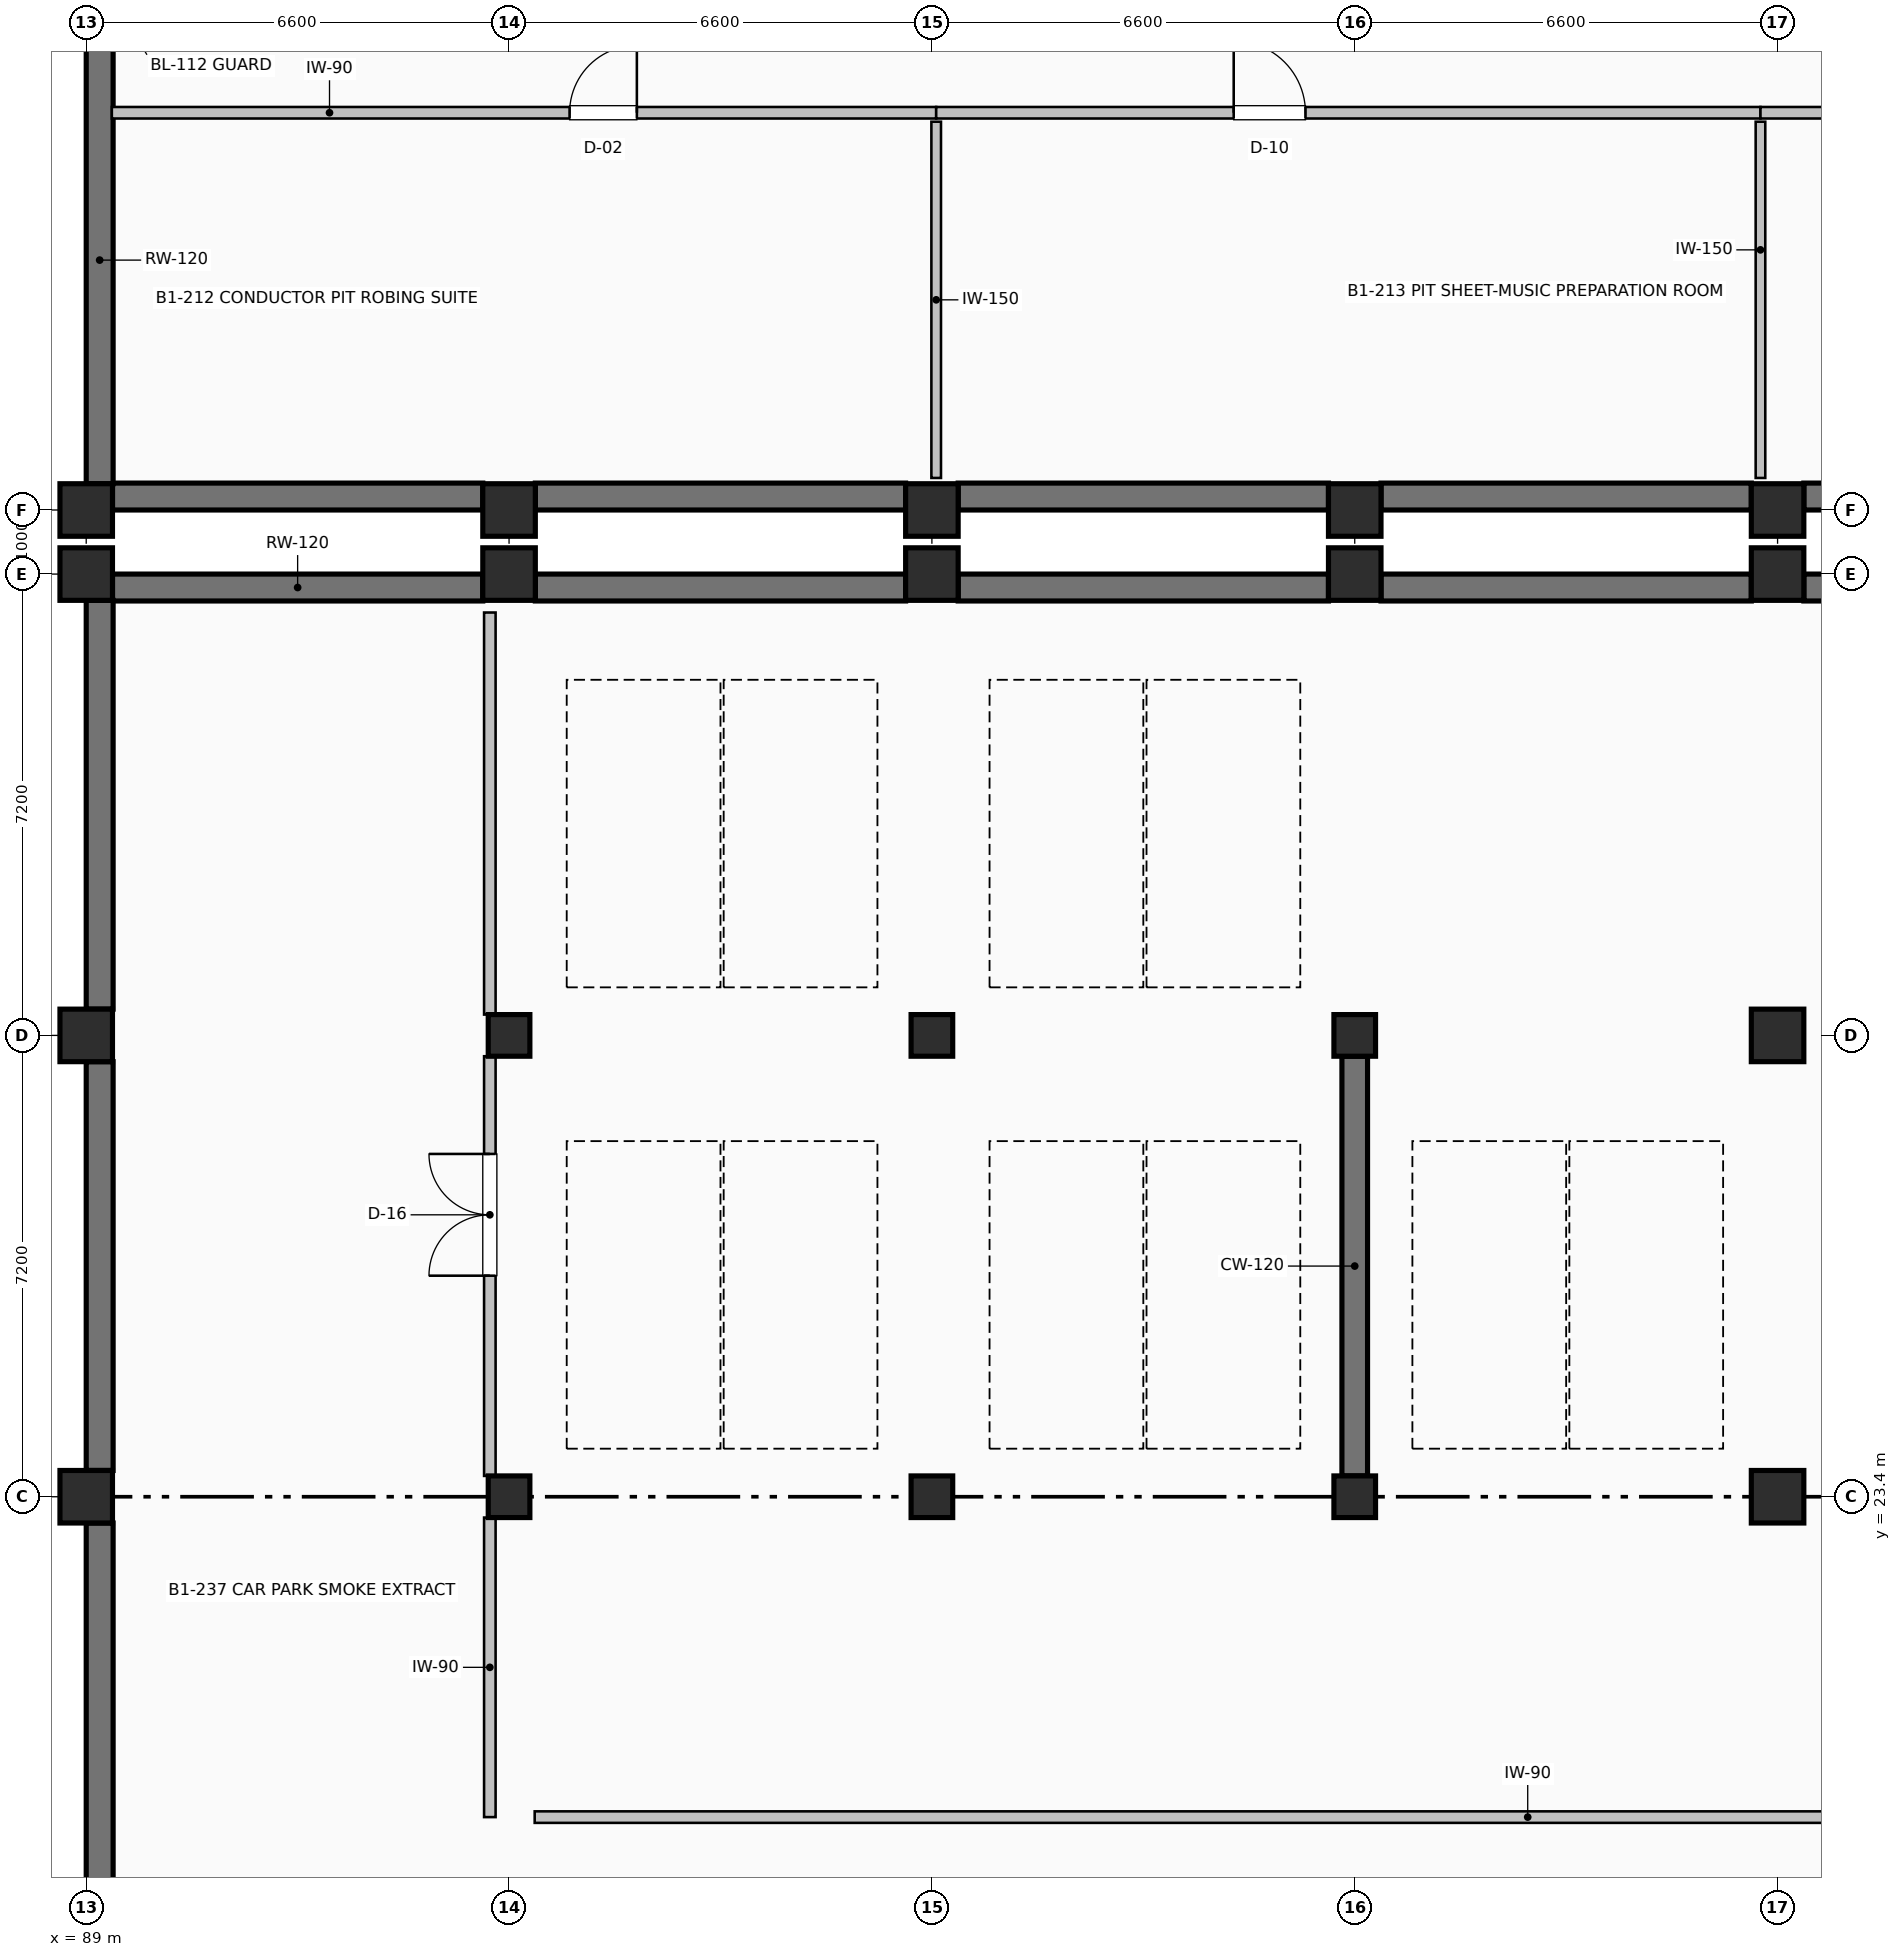
"""IFC4 building model, lengths in metres.
Left out: names, types, materials, properties, quantities, classifications, styles, units other than length and angle.
Written with IfcOpenShell. Run it as: python <this file> out.ifc"""

import sys

from ifc_helpers import new_model, si_unit, direction, frame, frame_2d, origin, origin_2d, place, context, subcontext, project, spatial, rectangle, extrude, element, fill, save


model = new_model("IFC4")
c1 = context("Model", 3, precision=1e-05, world=origin(), true_north=direction((0.0, 1.0)))
c2 = subcontext(c1, "Body", "Model", "MODEL_VIEW")
j1 = project(units=[si_unit("LENGTHUNIT", "METRE"), si_unit("PLANEANGLEUNIT", "RADIAN")], contexts=[c1])
p1 = place(None, origin())
s1 = spatial("IfcSite", under=j1, at=p1, CompositionType="ELEMENT")
p2 = place(p1, origin())
s2 = spatial("IfcBuilding", under=s1, at=p2, CompositionType="ELEMENT")
p3 = place(p2, frame((0.0, 0.0, -4.8)))
s3 = spatial("IfcBuildingStorey", under=s2, at=p3, CompositionType="ELEMENT", Elevation=-4.8)
for number, where, z_axis, x_axis in (
    (1, (89.0, 38.8, 0.0), (0.0, 0.0, 1.0), (1.0, 0.0, 0.0)),
    (2, (95.6, 38.8, 0.0), (0.0, 0.0, 1.0), (1.0, 0.0, 0.0)),
    (3, (102.2, 38.8, 0.0), (0.0, 0.0, 1.0), (1.0, 0.0, 0.0)),
    (4, (108.8, 38.8, 0.0), (0.0, 0.0, 1.0), (1.0, 0.0, 0.0)),
    (5, (115.4, 38.8, 0.0), (0.0, 0.0, 1.0), (1.0, 0.0, 0.0)),
    (6, (89.0, 23.4, 0.0), (0.0, 0.0, 1.0), (1.0, 0.0, 0.0)),
    (7, (89.0, 30.6, 0.0), (0.0, 0.0, 1.0), (1.0, 0.0, 0.0)),
    (8, (89.0, 37.8, 0.0), (0.0, 0.0, 1.0), (1.0, 0.0, 0.0)),
):
    element("IfcColumn", number, at=place(p3, frame(where, z_axis=z_axis, x_axis=x_axis)), inside=s3, PredefinedType="COLUMN", context=c2, shape_type="SweptSolid", body=[
        extrude(rectangle(XDim=0.82, YDim=0.82, at=origin_2d()), origin(), (0.0, 0.0, 1.0), 4.8),
    ])
for number, where, z_axis, x_axis in (
    (9, (95.6, 23.4, 0.0), (0.0, 0.0, 1.0), (1.0, 0.0, 0.0)),
    (10, (95.6, 30.6, 0.0), (0.0, 0.0, 1.0), (1.0, 0.0, 0.0)),
):
    element("IfcColumn", number, at=place(p3, frame(where, z_axis=z_axis, x_axis=x_axis)), inside=s3, PredefinedType="COLUMN", context=c2, shape_type="SweptSolid", body=[
        extrude(rectangle(XDim=0.65, YDim=0.65, at=origin_2d()), origin(), (0.0, 0.0, 1.0), 4.8),
    ])
p4 = place(p3, frame((95.6, 37.8, 0.0), z_axis=(0.0, 0.0, 1.0), x_axis=(1.0, 0.0, 0.0)))
e11 = element("IfcColumn", 11, at=p4, inside=s3, PredefinedType="COLUMN", context=c2, shape_type="SweptSolid", body=[
    extrude(rectangle(XDim=0.82, YDim=0.82, at=origin_2d()), origin(), (0.0, 0.0, 1.0), 4.8),
])
for number, where, z_axis, x_axis in (
    (12, (102.2, 23.4, 0.0), (0.0, 0.0, 1.0), (1.0, 0.0, 0.0)),
    (13, (102.2, 30.6, 0.0), (0.0, 0.0, 1.0), (1.0, 0.0, 0.0)),
):
    element("IfcColumn", number, at=place(p3, frame(where, z_axis=z_axis, x_axis=x_axis)), inside=s3, PredefinedType="COLUMN", context=c2, shape_type="SweptSolid", body=[
        extrude(rectangle(XDim=0.65, YDim=0.65, at=origin_2d()), origin(), (0.0, 0.0, 1.0), 4.8),
    ])
p5 = place(p3, frame((102.2, 37.8, 0.0), z_axis=(0.0, 0.0, 1.0), x_axis=(1.0, 0.0, 0.0)))
e14 = element("IfcColumn", 14, at=p5, inside=s3, PredefinedType="COLUMN", context=c2, shape_type="SweptSolid", body=[
    extrude(rectangle(XDim=0.82, YDim=0.82, at=origin_2d()), origin(), (0.0, 0.0, 1.0), 4.8),
])
for number, where, z_axis, x_axis in (
    (15, (108.8, 23.4, 0.0), (0.0, 0.0, 1.0), (1.0, 0.0, 0.0)),
    (16, (108.8, 30.6, 0.0), (0.0, 0.0, 1.0), (1.0, 0.0, 0.0)),
):
    element("IfcColumn", number, at=place(p3, frame(where, z_axis=z_axis, x_axis=x_axis)), inside=s3, PredefinedType="COLUMN", context=c2, shape_type="SweptSolid", body=[
        extrude(rectangle(XDim=0.65, YDim=0.65, at=origin_2d()), origin(), (0.0, 0.0, 1.0), 4.8),
    ])
for number, where, z_axis, x_axis in (
    (17, (108.8, 37.8, 0.0), (0.0, 0.0, 1.0), (1.0, 0.0, 0.0)),
    (18, (115.4, 23.4, 0.0), (0.0, 0.0, 1.0), (1.0, 0.0, 0.0)),
    (19, (115.4, 30.6, 0.0), (0.0, 0.0, 1.0), (1.0, 0.0, 0.0)),
    (20, (115.4, 37.8, 0.0), (0.0, 0.0, 1.0), (1.0, 0.0, 0.0)),
):
    element("IfcColumn", number, at=place(p3, frame(where, z_axis=z_axis, x_axis=x_axis)), inside=s3, PredefinedType="COLUMN", context=c2, shape_type="SweptSolid", body=[
        extrude(rectangle(XDim=0.82, YDim=0.82, at=origin_2d()), origin(), (0.0, 0.0, 1.0), 4.8),
    ])
p6 = place(p3, frame((108.8, 23.725, 0.0), z_axis=(0.0, 0.0, 1.0), x_axis=(0.0, 1.0, 0.0)))
e21 = element("IfcWall", 21, at=p6, inside=s3, PredefinedType="SHEAR", context=c2, shape_type="SweptSolid", body=[
    extrude(rectangle(XDim=6.55, YDim=0.4, at=frame_2d((3.275, 0.0))), origin(), (0.0, 0.0, 1.0), 4.48),
])
for number, where, z_axis, x_axis in (
    (22, (121.59, 39.01, 0.0), (0.0, 0.0, 1.0), (-1.0, 0.0, 0.0)),
    (23, (114.99, 39.01, 0.0), (0.0, 0.0, 1.0), (-1.0, 0.0, 0.0)),
):
    element("IfcWall", number, at=place(p3, frame(where, z_axis=z_axis, x_axis=x_axis)), inside=s3, PredefinedType="SHEAR", context=c2, shape_type="SweptSolid", body=[
        extrude(rectangle(XDim=5.78, YDim=0.42, at=frame_2d((2.89, 0.0))), origin(), (0.0, 0.0, 1.0), 4.5),
    ])
p7 = place(p3, frame((108.39, 39.01, 0.0), z_axis=(0.0, 0.0, 1.0), x_axis=(-1.0, 0.0, 0.0)))
e24 = element("IfcWall", 24, at=p7, inside=s3, PredefinedType="SHEAR", context=c2, shape_type="SweptSolid", body=[
    extrude(rectangle(XDim=5.78, YDim=0.42, at=frame_2d((2.89, 0.0))), origin(), (0.0, 0.0, 1.0), 4.5),
])
for number, where, z_axis, x_axis in (
    (25, (101.79, 39.01, 0.0), (0.0, 0.0, 1.0), (-1.0, 0.0, 0.0)),
    (26, (95.19, 39.01, 0.0), (0.0, 0.0, 1.0), (-1.0, 0.0, 0.0)),
):
    element("IfcWall", number, at=place(p3, frame(where, z_axis=z_axis, x_axis=x_axis)), inside=s3, PredefinedType="SHEAR", context=c2, shape_type="SweptSolid", body=[
        extrude(rectangle(XDim=5.78, YDim=0.42, at=frame_2d((2.89, 0.0))), origin(), (0.0, 0.0, 1.0), 4.5),
    ])
p8 = place(p3, frame((89.21, 39.21, 0.0), z_axis=(0.0, 0.0, 1.0), x_axis=(0.0, 1.0, 0.0)))
e27 = element("IfcWall", 27, at=p8, inside=s3, PredefinedType="SHEAR", context=c2, shape_type="SweptSolid", body=[
    extrude(rectangle(XDim=6.98, YDim=0.42, at=frame_2d((3.49, 0.0))), origin(), (0.0, 0.0, 1.0), 4.5),
])
for number, where, z_axis, x_axis in (
    (28, (89.41, 37.59, 0.0), (0.0, 0.0, 1.0), (1.0, 0.0, 0.0)),
    (29, (96.01, 37.59, 0.0), (0.0, 0.0, 1.0), (1.0, 0.0, 0.0)),
):
    element("IfcWall", number, at=place(p3, frame(where, z_axis=z_axis, x_axis=x_axis)), inside=s3, PredefinedType="SHEAR", context=c2, shape_type="SweptSolid", body=[
        extrude(rectangle(XDim=5.78, YDim=0.42, at=frame_2d((2.89, 0.0))), origin(), (0.0, 0.0, 1.0), 4.5),
    ])
p9 = place(p3, frame((102.61, 37.59, 0.0), z_axis=(0.0, 0.0, 1.0), x_axis=(1.0, 0.0, 0.0)))
e30 = element("IfcWall", 30, at=p9, inside=s3, PredefinedType="SHEAR", context=c2, shape_type="SweptSolid", body=[
    extrude(rectangle(XDim=5.78, YDim=0.42, at=frame_2d((2.89, 0.0))), origin(), (0.0, 0.0, 1.0), 4.5),
])
for number, where, z_axis, x_axis in (
    (31, (109.21, 37.59, 0.0), (0.0, 0.0, 1.0), (1.0, 0.0, 0.0)),
    (32, (115.81, 37.59, 0.0), (0.0, 0.0, 1.0), (1.0, 0.0, 0.0)),
):
    element("IfcWall", number, at=place(p3, frame(where, z_axis=z_axis, x_axis=x_axis)), inside=s3, PredefinedType="SHEAR", context=c2, shape_type="SweptSolid", body=[
        extrude(rectangle(XDim=5.78, YDim=0.42, at=frame_2d((2.89, 0.0))), origin(), (0.0, 0.0, 1.0), 4.5),
    ])
for number, where, z_axis, x_axis in (
    (33, (89.21, 16.61, 0.0), (0.0, 0.0, 1.0), (0.0, 1.0, 0.0)),
    (34, (89.21, 23.81, 0.0), (0.0, 0.0, 1.0), (0.0, 1.0, 0.0)),
    (35, (89.21, 31.01, 0.0), (0.0, 0.0, 1.0), (0.0, 1.0, 0.0)),
):
    element("IfcWall", number, at=place(p3, frame(where, z_axis=z_axis, x_axis=x_axis)), inside=s3, PredefinedType="SHEAR", context=c2, shape_type="SweptSolid", body=[
        extrude(rectangle(XDim=6.38, YDim=0.42, at=frame_2d((3.19, 0.0))), origin(), (0.0, 0.0, 1.0), 4.5),
    ])
p10 = place(p3, frame((89.4, 45.0, 0.0), z_axis=(0.0, 0.0, 1.0), x_axis=(1.0, 0.0, 0.0)))
e36 = element("IfcWall", 36, at=p10, inside=s3, PredefinedType="PARTITIONING", context=c2, shape_type="SweptSolid", body=[
    extrude(rectangle(XDim=12.867, YDim=0.18, at=frame_2d((6.434, 0.0))), origin(), (0.0, 0.0, 1.0), 4.472),
])
p11 = place(p10, frame((7.145, 0.0, 0.0)))
e37 = element("IfcOpeningElement", 37, at=p11, cuts=e36, PredefinedType="OPENING", context=c2, shape_type="SweptSolid", body=[
    extrude(rectangle(XDim=1.05, YDim=2.1, at=frame_2d((0.525, 1.05))), frame((0.0, 0.1, 0.0), z_axis=(0.0, -1.0, 0.0), x_axis=(1.0, 0.0, 0.0)), (0.0, 0.0, 1.0), 0.2),
])
p12 = place(p3, frame((102.267, 39.3, 0.0), z_axis=(0.0, 0.0, 1.0), x_axis=(0.0, 1.0, 0.0)))
e38 = element("IfcWall", 38, at=p12, inside=s3, PredefinedType="PARTITIONING", context=c2, shape_type="SweptSolid", body=[
    extrude(rectangle(XDim=5.56, YDim=0.15, at=frame_2d((2.78, 0.0))), origin(), (0.0, 0.0, 1.0), 3.622),
])
p13 = place(p3, frame((102.267, 45.0, 0.0), z_axis=(0.0, 0.0, 1.0), x_axis=(1.0, 0.0, 0.0)))
e39 = element("IfcWall", 39, at=p13, inside=s3, PredefinedType="PARTITIONING", context=c2, shape_type="SweptSolid", body=[
    extrude(rectangle(XDim=12.866, YDim=0.18, at=frame_2d((6.433, 0.0))), origin(), (0.0, 0.0, 1.0), 4.472),
])
p14 = place(p13, frame((4.644, 0.0, 0.0)))
e40 = element("IfcOpeningElement", 40, at=p14, cuts=e39, PredefinedType="OPENING", context=c2, shape_type="SweptSolid", body=[
    extrude(rectangle(XDim=1.12, YDim=2.12, at=frame_2d((0.56, 1.06))), frame((0.0, 0.1, 0.0), z_axis=(0.0, -1.0, 0.0), x_axis=(1.0, 0.0, 0.0)), (0.0, 0.0, 1.0), 0.2),
])
p15 = place(p3, frame((115.133, 39.3, 0.0), z_axis=(0.0, 0.0, 1.0), x_axis=(0.0, 1.0, 0.0)))
e41 = element("IfcWall", 41, at=p15, inside=s3, PredefinedType="PARTITIONING", context=c2, shape_type="SweptSolid", body=[
    extrude(rectangle(XDim=5.56, YDim=0.15, at=frame_2d((2.78, 0.0))), origin(), (0.0, 0.0, 1.0), 3.622),
])
p16 = place(p3, frame((115.133, 45.0, 0.0), z_axis=(0.0, 0.0, 1.0), x_axis=(1.0, 0.0, 0.0)))
e42 = element("IfcWall", 42, at=p16, inside=s3, PredefinedType="PARTITIONING", context=c2, shape_type="SweptSolid", body=[
    extrude(rectangle(XDim=12.867, YDim=0.18, at=frame_2d((6.434, 0.0))), origin(), (0.0, 0.0, 1.0), 4.472),
])
p17 = place(p16, frame((4.771, 0.0, 0.0)))
e43 = element("IfcOpeningElement", 43, at=p17, cuts=e42, PredefinedType="OPENING", context=c2, shape_type="SweptSolid", body=[
    extrude(rectangle(XDim=1.16, YDim=2.1, at=frame_2d((0.58, 1.05))), frame((0.0, 0.1, 0.0), z_axis=(0.0, -1.0, 0.0), x_axis=(1.0, 0.0, 0.0)), (0.0, 0.0, 1.0), 0.2),
])
p18 = place(p3, frame((95.3, 18.4, 0.0), z_axis=(0.0, 0.0, 1.0), x_axis=(0.0, 1.0, 0.0)))
e44 = element("IfcWall", 44, at=p18, inside=s3, PredefinedType="PARTITIONING", context=c2, shape_type="SweptSolid", body=[
    extrude(rectangle(XDim=4.675, YDim=0.18, at=frame_2d((2.337, 0.0))), origin(), (0.0, 0.0, 1.0), 4.492),
])
p19 = place(p3, frame((95.3, 23.725, 0.0), z_axis=(0.0, 0.0, 1.0), x_axis=(0.0, 1.0, 0.0)))
e45 = element("IfcWall", 45, at=p19, inside=s3, PredefinedType="PARTITIONING", context=c2, shape_type="SweptSolid", body=[
    extrude(rectangle(XDim=6.55, YDim=0.18, at=frame_2d((3.275, 0.0))), origin(), (0.0, 0.0, 1.0), 4.492),
])
p20 = place(p19, frame((3.125, 0.0, 0.0)))
e46 = element("IfcOpeningElement", 46, at=p20, cuts=e45, PredefinedType="OPENING", context=c2, shape_type="SweptSolid", body=[
    extrude(rectangle(XDim=1.9, YDim=2.26, at=frame_2d((0.95, 1.13))), frame((0.0, 0.1, 0.0), z_axis=(0.0, -1.0, 0.0), x_axis=(1.0, 0.0, 0.0)), (0.0, 0.0, 1.0), 0.2),
])
p21 = place(p3, frame((95.3, 30.925, 0.0), z_axis=(0.0, 0.0, 1.0), x_axis=(0.0, 1.0, 0.0)))
e47 = element("IfcWall", 47, at=p21, inside=s3, PredefinedType="PARTITIONING", context=c2, shape_type="SweptSolid", body=[
    extrude(rectangle(XDim=6.275, YDim=0.18, at=frame_2d((3.137, 0.0))), origin(), (0.0, 0.0, 1.0), 4.492),
])
p22 = place(p3, frame((96.0, 18.4, 0.0), z_axis=(0.0, 0.0, 1.0), x_axis=(1.0, 0.0, 0.0)))
e48 = element("IfcWall", 48, at=p22, inside=s3, PredefinedType="PARTITIONING", context=c2, shape_type="SweptSolid", body=[
    extrude(rectangle(XDim=84.4, YDim=0.18, at=frame_2d((42.2, 0.0))), origin(), (0.0, 0.0, 1.0), 4.492),
])
p23 = place(p22, frame((40.4, 0.0, 0.0)))
e49 = element("IfcOpeningElement", 49, at=p23, cuts=e48, PredefinedType="OPENING", context=c2, shape_type="SweptSolid", body=[
    extrude(rectangle(XDim=3.6, YDim=2.6, at=frame_2d((1.8, 1.3))), frame((0.0, 0.1, 0.0), z_axis=(0.0, -1.0, 0.0), x_axis=(1.0, 0.0, 0.0)), (0.0, 0.0, 1.0), 0.2),
])
p24 = place(p11, origin())
e50 = element("IfcDoor", 50, at=p24, inside=s3, OperationType="SINGLE_SWING_RIGHT", PredefinedType="DOOR", context=c2, shape_type="SweptSolid", body=[
    extrude(rectangle(XDim=1.05, YDim=2.1, at=frame_2d((0.525, 1.05))), frame((0.0, 0.025, 0.0), z_axis=(0.0, -1.0, 0.0), x_axis=(1.0, 0.0, 0.0)), (0.0, 0.0, 1.0), 0.05),
])
fill(e37, e50)
p25 = place(p14, origin())
e51 = element("IfcDoor", 51, at=p25, inside=s3, OperationType="SINGLE_SWING_LEFT", PredefinedType="DOOR", context=c2, shape_type="SweptSolid", body=[
    extrude(rectangle(XDim=1.12, YDim=2.12, at=frame_2d((0.56, 1.06))), frame((0.0, 0.025, 0.0), z_axis=(0.0, -1.0, 0.0), x_axis=(1.0, 0.0, 0.0)), (0.0, 0.0, 1.0), 0.05),
])
fill(e40, e51)
p26 = place(p20, origin())
e52 = element("IfcDoor", 52, at=p26, inside=s3, OperationType="DOUBLE_DOOR_SINGLE_SWING", PredefinedType="DOOR", context=c2, shape_type="SweptSolid", body=[
    extrude(rectangle(XDim=1.9, YDim=2.26, at=frame_2d((0.95, 1.13))), frame((0.0, 0.025, 0.0), z_axis=(0.0, -1.0, 0.0), x_axis=(1.0, 0.0, 0.0)), (0.0, 0.0, 1.0), 0.05),
])
fill(e46, e52)
save(model, sys.argv[1])
